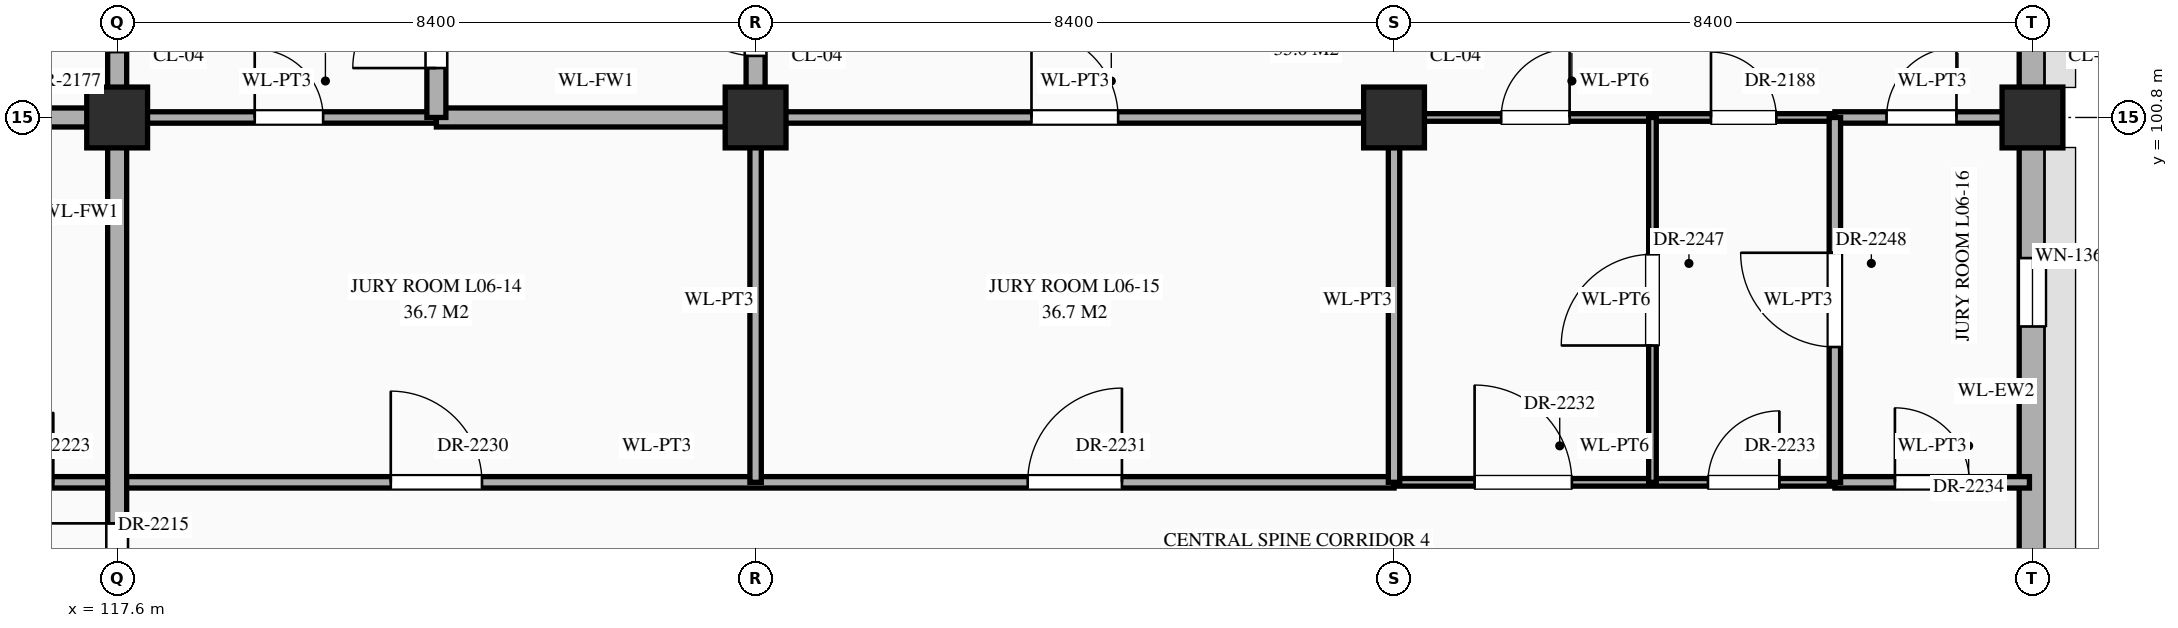
"""IFC4 building model, lengths in metres.
Left out: names, types, materials, properties, quantities, classifications, styles, units other than length and angle.
Written with IfcOpenShell. Run it as: python <this file> out.ifc"""

import sys

from ifc_helpers import new_model, si_unit, direction, frame, frame_2d, origin, origin_2d, place, context, subcontext, project, spatial, rectangle, extrude, element, fill, save


model = new_model("IFC4")
c1 = context("Model", 3, precision=1e-05, world=origin(), true_north=direction((0.0, 1.0)))
c2 = subcontext(c1, "Body", "Model", "MODEL_VIEW")
j1 = project(units=[si_unit("LENGTHUNIT", "METRE"), si_unit("PLANEANGLEUNIT", "RADIAN")], contexts=[c1])
p1 = place(None, origin())
s1 = spatial("IfcSite", under=j1, at=p1, CompositionType="ELEMENT")
p2 = place(p1, origin())
s2 = spatial("IfcBuilding", under=s1, at=p2, CompositionType="ELEMENT")
p3 = place(p2, frame((0.0, 0.0, 26.1)))
s3 = spatial("IfcBuildingStorey", under=s2, at=p3, CompositionType="ELEMENT", Elevation=26.1)
for number, where, z_axis, x_axis in (
    (1, (117.6, 100.8, 0.0), (0.0, 0.0, 1.0), (1.0, 0.0, 0.0)),
    (2, (126.0, 100.8, 0.0), (0.0, 0.0, 1.0), (1.0, 0.0, 0.0)),
    (3, (134.4, 100.8, 0.0), (0.0, 0.0, 1.0), (1.0, 0.0, 0.0)),
    (4, (142.8, 100.8, 0.0), (0.0, 0.0, 1.0), (1.0, 0.0, 0.0)),
):
    element("IfcColumn", number, at=place(p3, frame(where, z_axis=z_axis, x_axis=x_axis)), inside=s3, PredefinedType="COLUMN", context=c2, shape_type="SweptSolid", body=[
        extrude(rectangle(XDim=0.8, YDim=0.8, at=origin_2d()), origin(), (0.0, 0.0, 1.0), 4.5),
    ])
p4 = place(p3, frame((142.8, 93.995, 0.0), z_axis=(0.0, 0.0, 1.0), x_axis=(0.0, 1.0, 0.0)))
e5 = element("IfcWall", 5, at=p4, inside=s3, PredefinedType="STANDARD", context=c2, shape_type="SweptSolid", body=[
    extrude(rectangle(XDim=6.41, YDim=0.35, at=frame_2d((3.205, 0.0))), origin(), (0.0, 0.0, 1.0), 3.59),
])
p5 = place(p4, frame((4.055, 0.0, 0.85)))
e6 = element("IfcOpeningElement", 6, at=p5, cuts=e5, PredefinedType="OPENING", context=c2, shape_type="SweptSolid", body=[
    extrude(rectangle(XDim=0.9, YDim=1.2, at=frame_2d((0.45, 0.6))), frame((0.0, 0.187, 0.0), z_axis=(0.0, -1.0, 0.0), x_axis=(1.0, 0.0, 0.0)), (0.0, 0.0, 1.0), 0.374),
])
p6 = place(p3, frame((142.8, 101.195, 0.0), z_axis=(0.0, 0.0, 1.0), x_axis=(0.0, 1.0, 0.0)))
e7 = element("IfcWall", 7, at=p6, inside=s3, PredefinedType="STANDARD", context=c2, shape_type="SweptSolid", body=[
    extrude(rectangle(XDim=6.41, YDim=0.35, at=frame_2d((3.205, 0.0))), origin(), (0.0, 0.0, 1.0), 3.59),
])
p7 = place(p6, frame((4.055, 0.0, 0.85)))
e8 = element("IfcOpeningElement", 8, at=p7, cuts=e7, PredefinedType="OPENING", context=c2, shape_type="SweptSolid", body=[
    extrude(rectangle(XDim=0.9, YDim=1.38, at=frame_2d((0.45, 0.69))), frame((0.0, 0.187, 0.0), z_axis=(0.0, -1.0, 0.0), x_axis=(1.0, 0.0, 0.0)), (0.0, 0.0, 1.0), 0.374),
])
p8 = place(p3, frame((115.0, 96.0, 0.0), z_axis=(0.0, 0.0, 1.0), x_axis=(1.0, 0.0, 0.0)))
e9 = element("IfcWall", 9, at=p8, inside=s3, PredefinedType="STANDARD", context=c2, shape_type="SweptSolid", body=[
    extrude(rectangle(XDim=19.4, YDim=0.15, at=frame_2d((9.7, 0.0))), origin(), (0.0, 0.0, 1.0), 4.24),
])
p9 = place(p8, frame((0.84, 0.0, 0.0)))
e10 = element("IfcOpeningElement", 10, at=p9, cuts=e9, PredefinedType="OPENING", context=c2, shape_type="SweptSolid", body=[
    extrude(rectangle(XDim=0.92, YDim=2.15, at=frame_2d((0.46, 1.075))), frame((0.0, 0.087, 0.0), z_axis=(0.0, -1.0, 0.0), x_axis=(1.0, 0.0, 0.0)), (0.0, 0.0, 1.0), 0.174),
])
p10 = place(p8, frame((6.2, 0.0, 0.0)))
e11 = element("IfcOpeningElement", 11, at=p10, cuts=e9, PredefinedType="OPENING", context=c2, shape_type="SweptSolid", body=[
    extrude(rectangle(XDim=1.2, YDim=2.35, at=frame_2d((0.6, 1.175))), frame((0.0, 0.087, 0.0), z_axis=(0.0, -1.0, 0.0), x_axis=(1.0, 0.0, 0.0)), (0.0, 0.0, 1.0), 0.174),
])
p11 = place(p8, frame((14.58, 0.0, 0.0)))
e12 = element("IfcOpeningElement", 12, at=p11, cuts=e9, PredefinedType="OPENING", context=c2, shape_type="SweptSolid", body=[
    extrude(rectangle(XDim=1.24, YDim=2.3, at=frame_2d((0.62, 1.15))), frame((0.0, 0.087, 0.0), z_axis=(0.0, -1.0, 0.0), x_axis=(1.0, 0.0, 0.0)), (0.0, 0.0, 1.0), 0.174),
])
p12 = place(p3, frame((134.4, 96.0, 0.0), z_axis=(0.0, 0.0, 1.0), x_axis=(1.0, 0.0, 0.0)))
e13 = element("IfcWall", 13, at=p12, inside=s3, PredefinedType="STANDARD", context=c2, shape_type="SweptSolid", body=[
    extrude(rectangle(XDim=5.8, YDim=0.1, at=frame_2d((2.9, 0.0))), origin(), (0.0, 0.0, 1.0), 4.24),
])
p13 = place(p12, frame((1.06, 0.0, 0.0)))
e14 = element("IfcOpeningElement", 14, at=p13, cuts=e13, PredefinedType="OPENING", context=c2, shape_type="SweptSolid", body=[
    extrude(rectangle(XDim=1.28, YDim=2.35, at=frame_2d((0.64, 1.175))), frame((0.0, 0.062, 0.0), z_axis=(0.0, -1.0, 0.0), x_axis=(1.0, 0.0, 0.0)), (0.0, 0.0, 1.0), 0.124),
])
p14 = place(p12, frame((4.13, 0.0, 0.0)))
e15 = element("IfcOpeningElement", 15, at=p14, cuts=e13, PredefinedType="OPENING", context=c2, shape_type="SweptSolid", body=[
    extrude(rectangle(XDim=0.94, YDim=2.3, at=frame_2d((0.47, 1.15))), frame((0.0, 0.062, 0.0), z_axis=(0.0, -1.0, 0.0), x_axis=(1.0, 0.0, 0.0)), (0.0, 0.0, 1.0), 0.124),
])
p15 = place(p3, frame((140.2, 96.0, 0.0), z_axis=(0.0, 0.0, 1.0), x_axis=(1.0, 0.0, 0.0)))
e16 = element("IfcWall", 16, at=p15, inside=s3, PredefinedType="STANDARD", context=c2, shape_type="SweptSolid", body=[
    extrude(rectangle(XDim=2.56, YDim=0.15, at=frame_2d((1.28, 0.0))), origin(), (0.0, 0.0, 1.0), 4.24),
])
p16 = place(p15, frame((0.79, 0.0, 0.0)))
e17 = element("IfcOpeningElement", 17, at=p16, cuts=e16, PredefinedType="OPENING", context=c2, shape_type="SweptSolid", body=[
    extrude(rectangle(XDim=0.98, YDim=2.35, at=frame_2d((0.49, 1.175))), frame((0.0, 0.087, 0.0), z_axis=(0.0, -1.0, 0.0), x_axis=(1.0, 0.0, 0.0)), (0.0, 0.0, 1.0), 0.174),
])
p17 = place(p3, frame((113.4, 100.8, 0.0), z_axis=(0.0, 0.0, 1.0), x_axis=(1.0, 0.0, 0.0)))
e18 = element("IfcWall", 18, at=p17, inside=s3, PredefinedType="STANDARD", context=c2, shape_type="SweptSolid", body=[
    extrude(rectangle(XDim=4.2, YDim=0.25, at=frame_2d((2.1, 0.0))), origin(), (0.0, 0.0, 1.0), 3.39),
])
p18 = place(p17, frame((0.3, 0.0, 0.0)))
e19 = element("IfcOpeningElement", 19, at=p18, cuts=e18, PredefinedType="OPENING", context=c2, shape_type="SweptSolid", body=[
    extrude(rectangle(XDim=1.0, YDim=2.2, at=frame_2d((0.5, 1.1))), frame((0.0, 0.137, 0.0), z_axis=(0.0, -1.0, 0.0), x_axis=(1.0, 0.0, 0.0)), (0.0, 0.0, 1.0), 0.274),
])
p19 = place(p17, frame((2.265, 0.0, 0.0)))
e20 = element("IfcOpeningElement", 20, at=p19, cuts=e18, PredefinedType="OPENING", context=c2, shape_type="SweptSolid", body=[
    extrude(rectangle(XDim=0.95, YDim=2.15, at=frame_2d((0.475, 1.075))), frame((0.0, 0.137, 0.0), z_axis=(0.0, -1.0, 0.0), x_axis=(1.0, 0.0, 0.0)), (0.0, 0.0, 1.0), 0.274),
])
p20 = place(p3, frame((117.6, 100.8, 0.0), z_axis=(0.0, 0.0, 1.0), x_axis=(1.0, 0.0, 0.0)))
e21 = element("IfcWall", 21, at=p20, inside=s3, PredefinedType="STANDARD", context=c2, shape_type="SweptSolid", body=[
    extrude(rectangle(XDim=4.2, YDim=0.15, at=frame_2d((2.1, 0.0))), origin(), (0.0, 0.0, 1.0), 3.39),
])
p21 = place(p20, frame((1.81, 0.0, 0.0)))
e22 = element("IfcOpeningElement", 22, at=p21, cuts=e21, PredefinedType="OPENING", context=c2, shape_type="SweptSolid", body=[
    extrude(rectangle(XDim=0.9, YDim=2.15, at=frame_2d((0.45, 1.075))), frame((0.0, 0.087, 0.0), z_axis=(0.0, -1.0, 0.0), x_axis=(1.0, 0.0, 0.0)), (0.0, 0.0, 1.0), 0.174),
])
p22 = place(p3, frame((121.8, 100.8, 0.0), z_axis=(0.0, 0.0, 1.0), x_axis=(1.0, 0.0, 0.0)))
e23 = element("IfcWall", 23, at=p22, inside=s3, PredefinedType="STANDARD", context=c2, shape_type="SweptSolid", body=[
    extrude(rectangle(XDim=4.2, YDim=0.25, at=frame_2d((2.1, 0.0))), origin(), (0.0, 0.0, 1.0), 3.39),
])
p23 = place(p3, frame((126.0, 100.8, 0.0), z_axis=(0.0, 0.0, 1.0), x_axis=(1.0, 0.0, 0.0)))
e24 = element("IfcWall", 24, at=p23, inside=s3, PredefinedType="STANDARD", context=c2, shape_type="SweptSolid", body=[
    extrude(rectangle(XDim=8.4, YDim=0.15, at=frame_2d((4.2, 0.0))), origin(), (0.0, 0.0, 1.0), 3.39),
])
p24 = place(p23, frame((3.63, 0.0, 0.0)))
e25 = element("IfcOpeningElement", 25, at=p24, cuts=e24, PredefinedType="OPENING", context=c2, shape_type="SweptSolid", body=[
    extrude(rectangle(XDim=1.14, YDim=2.4, at=frame_2d((0.57, 1.2))), frame((0.0, 0.087, 0.0), z_axis=(0.0, -1.0, 0.0), x_axis=(1.0, 0.0, 0.0)), (0.0, 0.0, 1.0), 0.174),
])
p25 = place(p3, frame((134.4, 100.8, 0.0), z_axis=(0.0, 0.0, 1.0), x_axis=(1.0, 0.0, 0.0)))
e26 = element("IfcWall", 26, at=p25, inside=s3, PredefinedType="STANDARD", context=c2, shape_type="SweptSolid", body=[
    extrude(rectangle(XDim=5.8, YDim=0.1, at=frame_2d((2.9, 0.0))), origin(), (0.0, 0.0, 1.0), 3.39),
])
p26 = place(p25, frame((1.41, 0.0, 0.0)))
e27 = element("IfcOpeningElement", 27, at=p26, cuts=e26, PredefinedType="OPENING", context=c2, shape_type="SweptSolid", body=[
    extrude(rectangle(XDim=0.9, YDim=2.15, at=frame_2d((0.45, 1.075))), frame((0.0, 0.062, 0.0), z_axis=(0.0, -1.0, 0.0), x_axis=(1.0, 0.0, 0.0)), (0.0, 0.0, 1.0), 0.124),
])
p27 = place(p25, frame((4.17, 0.0, 0.0)))
e28 = element("IfcOpeningElement", 28, at=p27, cuts=e26, PredefinedType="OPENING", context=c2, shape_type="SweptSolid", body=[
    extrude(rectangle(XDim=0.86, YDim=2.1, at=frame_2d((0.43, 1.05))), frame((0.0, 0.062, 0.0), z_axis=(0.0, -1.0, 0.0), x_axis=(1.0, 0.0, 0.0)), (0.0, 0.0, 1.0), 0.124),
])
p28 = place(p3, frame((140.2, 100.8, 0.0), z_axis=(0.0, 0.0, 1.0), x_axis=(1.0, 0.0, 0.0)))
e29 = element("IfcWall", 29, at=p28, inside=s3, PredefinedType="STANDARD", context=c2, shape_type="SweptSolid", body=[
    extrude(rectangle(XDim=2.56, YDim=0.15, at=frame_2d((1.28, 0.0))), origin(), (0.0, 0.0, 1.0), 3.39),
])
p29 = place(p28, frame((0.68, 0.0, 0.0)))
e30 = element("IfcOpeningElement", 30, at=p29, cuts=e29, PredefinedType="OPENING", context=c2, shape_type="SweptSolid", body=[
    extrude(rectangle(XDim=0.92, YDim=2.15, at=frame_2d((0.46, 1.075))), frame((0.0, 0.087, 0.0), z_axis=(0.0, -1.0, 0.0), x_axis=(1.0, 0.0, 0.0)), (0.0, 0.0, 1.0), 0.174),
])
p30 = place(p3, frame((117.6, 91.2, 0.0), z_axis=(0.0, 0.0, 1.0), x_axis=(0.0, 1.0, 0.0)))
e31 = element("IfcWall", 31, at=p30, inside=s3, PredefinedType="STANDARD", context=c2, shape_type="SweptSolid", body=[
    extrude(rectangle(XDim=13.2, YDim=0.25, at=frame_2d((6.6, 0.0))), origin(), (0.0, 0.0, 1.0), 3.49),
])
p31 = place(p30, frame((0.49, 0.0, 0.0)))
e32 = element("IfcOpeningElement", 32, at=p31, cuts=e31, PredefinedType="OPENING", context=c2, shape_type="SweptSolid", body=[
    extrude(rectangle(XDim=1.1, YDim=2.2, at=frame_2d((0.55, 1.1))), frame((0.0, 0.137, 0.0), z_axis=(0.0, -1.0, 0.0), x_axis=(1.0, 0.0, 0.0)), (0.0, 0.0, 1.0), 0.274),
])
p32 = place(p30, frame((10.46, 0.0, 0.0)))
e33 = element("IfcOpeningElement", 33, at=p32, cuts=e31, PredefinedType="OPENING", context=c2, shape_type="SweptSolid", body=[
    extrude(rectangle(XDim=1.0, YDim=2.2, at=frame_2d((0.5, 1.1))), frame((0.0, 0.137, 0.0), z_axis=(0.0, -1.0, 0.0), x_axis=(1.0, 0.0, 0.0)), (0.0, 0.0, 1.0), 0.274),
])
p33 = place(p30, frame((3.26, 0.0, 0.0)))
e34 = element("IfcOpeningElement", 34, at=p33, cuts=e31, PredefinedType="OPENING", context=c2, shape_type="SweptSolid", body=[
    extrude(rectangle(XDim=1.0, YDim=2.2, at=frame_2d((0.5, 1.1))), frame((0.0, 0.137, 0.0), z_axis=(0.0, -1.0, 0.0), x_axis=(1.0, 0.0, 0.0)), (0.0, 0.0, 1.0), 0.274),
])
p34 = place(p3, frame((121.8, 100.8, 0.0), z_axis=(0.0, 0.0, 1.0), x_axis=(0.0, 1.0, 0.0)))
e35 = element("IfcWall", 35, at=p34, inside=s3, PredefinedType="STANDARD", context=c2, shape_type="SweptSolid", body=[
    extrude(rectangle(XDim=3.6, YDim=0.25, at=frame_2d((1.8, 0.0))), origin(), (0.0, 0.0, 1.0), 3.89),
])
p35 = place(p34, frame((0.65, 0.0, 0.0)))
e36 = element("IfcOpeningElement", 36, at=p35, cuts=e35, PredefinedType="OPENING", context=c2, shape_type="SweptSolid", body=[
    extrude(rectangle(XDim=1.1, YDim=2.2, at=frame_2d((0.55, 1.1))), frame((0.0, 0.137, 0.0), z_axis=(0.0, -1.0, 0.0), x_axis=(1.0, 0.0, 0.0)), (0.0, 0.0, 1.0), 0.274),
])
p36 = place(p3, frame((126.0, 96.0, 0.0), z_axis=(0.0, 0.0, 1.0), x_axis=(0.0, 1.0, 0.0)))
e37 = element("IfcWall", 37, at=p36, inside=s3, PredefinedType="STANDARD", context=c2, shape_type="SweptSolid", body=[
    extrude(rectangle(XDim=4.8, YDim=0.15, at=frame_2d((2.4, 0.0))), origin(), (0.0, 0.0, 1.0), 3.49),
])
p37 = place(p3, frame((126.0, 100.8, 0.0), z_axis=(0.0, 0.0, 1.0), x_axis=(0.0, 1.0, 0.0)))
e38 = element("IfcWall", 38, at=p37, inside=s3, PredefinedType="STANDARD", context=c2, shape_type="SweptSolid", body=[
    extrude(rectangle(XDim=3.6, YDim=0.25, at=frame_2d((1.8, 0.0))), origin(), (0.0, 0.0, 1.0), 3.49),
])
p38 = place(p37, frame((0.81, 0.0, 0.0)))
e39 = element("IfcOpeningElement", 39, at=p38, cuts=e38, PredefinedType="OPENING", context=c2, shape_type="SweptSolid", body=[
    extrude(rectangle(XDim=1.1, YDim=2.2, at=frame_2d((0.55, 1.1))), frame((0.0, 0.137, 0.0), z_axis=(0.0, -1.0, 0.0), x_axis=(1.0, 0.0, 0.0)), (0.0, 0.0, 1.0), 0.274),
])
p39 = place(p3, frame((134.4, 96.0, 0.0), z_axis=(0.0, 0.0, 1.0), x_axis=(0.0, 1.0, 0.0)))
e40 = element("IfcWall", 40, at=p39, inside=s3, PredefinedType="STANDARD", context=c2, shape_type="SweptSolid", body=[
    extrude(rectangle(XDim=4.8, YDim=0.15, at=frame_2d((2.4, 0.0))), origin(), (0.0, 0.0, 1.0), 4.24),
])
p40 = place(p3, frame((137.8, 96.0, 0.0), z_axis=(0.0, 0.0, 1.0), x_axis=(0.0, 1.0, 0.0)))
e41 = element("IfcWall", 41, at=p40, inside=s3, PredefinedType="STANDARD", context=c2, shape_type="SweptSolid", body=[
    extrude(rectangle(XDim=4.8, YDim=0.1, at=frame_2d((2.4, 0.0))), origin(), (0.0, 0.0, 1.0), 4.24),
])
p41 = place(p40, frame((1.8, 0.0, 0.0)))
e42 = element("IfcOpeningElement", 42, at=p41, cuts=e41, PredefinedType="OPENING", context=c2, shape_type="SweptSolid", body=[
    extrude(rectangle(XDim=1.2, YDim=2.35, at=frame_2d((0.6, 1.175))), frame((0.0, 0.062, 0.0), z_axis=(0.0, -1.0, 0.0), x_axis=(1.0, 0.0, 0.0)), (0.0, 0.0, 1.0), 0.124),
])
p42 = place(p3, frame((140.2, 96.0, 0.0), z_axis=(0.0, 0.0, 1.0), x_axis=(0.0, 1.0, 0.0)))
e43 = element("IfcWall", 43, at=p42, inside=s3, PredefinedType="STANDARD", context=c2, shape_type="SweptSolid", body=[
    extrude(rectangle(XDim=4.8, YDim=0.15, at=frame_2d((2.4, 0.0))), origin(), (0.0, 0.0, 1.0), 4.24),
])
p43 = place(p42, frame((1.78, 0.0, 0.0)))
e44 = element("IfcOpeningElement", 44, at=p43, cuts=e43, PredefinedType="OPENING", context=c2, shape_type="SweptSolid", body=[
    extrude(rectangle(XDim=1.24, YDim=2.3, at=frame_2d((0.62, 1.15))), frame((0.0, 0.087, 0.0), z_axis=(0.0, -1.0, 0.0), x_axis=(1.0, 0.0, 0.0)), (0.0, 0.0, 1.0), 0.174),
])
p44 = place(p5, origin())
e45 = element("IfcWindow", 45, at=p44, inside=s3, PartitioningType="SINGLE_PANEL", PredefinedType="WINDOW", context=c2, shape_type="SweptSolid", body=[
    extrude(rectangle(XDim=0.9, YDim=1.2, at=frame_2d((0.45, 0.6))), frame((0.0, 0.03, 0.0), z_axis=(0.0, -1.0, 0.0), x_axis=(1.0, 0.0, 0.0)), (0.0, 0.0, 1.0), 0.06),
])
fill(e6, e45)
p45 = place(p35, origin())
e46 = element("IfcDoor", 46, at=p45, inside=s3, OperationType="SINGLE_SWING_LEFT", PredefinedType="DOOR", context=c2, shape_type="SweptSolid", body=[
    extrude(rectangle(XDim=1.1, YDim=2.2, at=frame_2d((0.55, 1.1))), frame((0.0, 0.025, 0.0), z_axis=(0.0, -1.0, 0.0), x_axis=(1.0, 0.0, 0.0)), (0.0, 0.0, 1.0), 0.05),
])
fill(e36, e46)
p46 = place(p21, origin())
e47 = element("IfcDoor", 47, at=p46, inside=s3, OperationType="SINGLE_SWING_LEFT", PredefinedType="DOOR", context=c2, shape_type="SweptSolid", body=[
    extrude(rectangle(XDim=0.9, YDim=2.15, at=frame_2d((0.45, 1.075))), frame((0.0, 0.025, 0.0), z_axis=(0.0, -1.0, 0.0), x_axis=(1.0, 0.0, 0.0)), (0.0, 0.0, 1.0), 0.05),
])
fill(e22, e47)
p47 = place(p38, origin())
e48 = element("IfcDoor", 48, at=p47, inside=s3, OperationType="SINGLE_SWING_RIGHT", PredefinedType="DOOR", context=c2, shape_type="SweptSolid", body=[
    extrude(rectangle(XDim=1.1, YDim=2.2, at=frame_2d((0.55, 1.1))), frame((0.0, 0.025, 0.0), z_axis=(0.0, -1.0, 0.0), x_axis=(1.0, 0.0, 0.0)), (0.0, 0.0, 1.0), 0.05),
])
fill(e39, e48)
p48 = place(p24, origin())
e49 = element("IfcDoor", 49, at=p48, inside=s3, OperationType="SINGLE_SWING_LEFT", PredefinedType="DOOR", context=c2, shape_type="SweptSolid", body=[
    extrude(rectangle(XDim=1.14, YDim=2.4, at=frame_2d((0.57, 1.2))), frame((0.0, 0.025, 0.0), z_axis=(0.0, -1.0, 0.0), x_axis=(1.0, 0.0, 0.0)), (0.0, 0.0, 1.0), 0.05),
])
fill(e25, e49)
p49 = place(p26, origin())
e50 = element("IfcDoor", 50, at=p49, inside=s3, OperationType="SINGLE_SWING_RIGHT", PredefinedType="DOOR", context=c2, shape_type="SweptSolid", body=[
    extrude(rectangle(XDim=0.9, YDim=2.15, at=frame_2d((0.45, 1.075))), frame((0.0, 0.025, 0.0), z_axis=(0.0, -1.0, 0.0), x_axis=(1.0, 0.0, 0.0)), (0.0, 0.0, 1.0), 0.05),
])
fill(e27, e50)
p50 = place(p27, origin())
e51 = element("IfcDoor", 51, at=p50, inside=s3, OperationType="SINGLE_SWING_LEFT", PredefinedType="DOOR", context=c2, shape_type="SweptSolid", body=[
    extrude(rectangle(XDim=0.86, YDim=2.1, at=frame_2d((0.43, 1.05))), frame((0.0, 0.025, 0.0), z_axis=(0.0, -1.0, 0.0), x_axis=(1.0, 0.0, 0.0)), (0.0, 0.0, 1.0), 0.05),
])
fill(e28, e51)
p51 = place(p29, origin())
e52 = element("IfcDoor", 52, at=p51, inside=s3, OperationType="SINGLE_SWING_RIGHT", PredefinedType="DOOR", context=c2, shape_type="SweptSolid", body=[
    extrude(rectangle(XDim=0.92, YDim=2.15, at=frame_2d((0.46, 1.075))), frame((0.0, 0.025, 0.0), z_axis=(0.0, -1.0, 0.0), x_axis=(1.0, 0.0, 0.0)), (0.0, 0.0, 1.0), 0.05),
])
fill(e30, e52)
p52 = place(p33, origin())
e53 = element("IfcDoor", 53, at=p52, inside=s3, OperationType="SINGLE_SWING_RIGHT", PredefinedType="DOOR", context=c2, shape_type="SweptSolid", body=[
    extrude(rectangle(XDim=1.0, YDim=2.2, at=frame_2d((0.5, 1.1))), frame((0.0, 0.025, 0.0), z_axis=(0.0, -1.0, 0.0), x_axis=(1.0, 0.0, 0.0)), (0.0, 0.0, 1.0), 0.05),
])
fill(e34, e53)
p53 = place(p9, origin())
e54 = element("IfcDoor", 54, at=p53, inside=s3, OperationType="SINGLE_SWING_RIGHT", PredefinedType="DOOR", context=c2, shape_type="SweptSolid", body=[
    extrude(rectangle(XDim=0.92, YDim=2.15, at=frame_2d((0.46, 1.075))), frame((0.0, 0.025, 0.0), z_axis=(0.0, -1.0, 0.0), x_axis=(1.0, 0.0, 0.0)), (0.0, 0.0, 1.0), 0.05),
])
fill(e10, e54)
p54 = place(p10, origin())
e55 = element("IfcDoor", 55, at=p54, inside=s3, OperationType="SINGLE_SWING_LEFT", PredefinedType="DOOR", context=c2, shape_type="SweptSolid", body=[
    extrude(rectangle(XDim=1.2, YDim=2.35, at=frame_2d((0.6, 1.175))), frame((0.0, 0.025, 0.0), z_axis=(0.0, -1.0, 0.0), x_axis=(1.0, 0.0, 0.0)), (0.0, 0.0, 1.0), 0.05),
])
fill(e11, e55)
p55 = place(p11, origin())
e56 = element("IfcDoor", 56, at=p55, inside=s3, OperationType="SINGLE_SWING_RIGHT", PredefinedType="DOOR", context=c2, shape_type="SweptSolid", body=[
    extrude(rectangle(XDim=1.24, YDim=2.3, at=frame_2d((0.62, 1.15))), frame((0.0, 0.025, 0.0), z_axis=(0.0, -1.0, 0.0), x_axis=(1.0, 0.0, 0.0)), (0.0, 0.0, 1.0), 0.05),
])
fill(e12, e56)
p56 = place(p13, origin())
e57 = element("IfcDoor", 57, at=p56, inside=s3, OperationType="SINGLE_SWING_LEFT", PredefinedType="DOOR", context=c2, shape_type="SweptSolid", body=[
    extrude(rectangle(XDim=1.28, YDim=2.35, at=frame_2d((0.64, 1.175))), frame((0.0, 0.025, 0.0), z_axis=(0.0, -1.0, 0.0), x_axis=(1.0, 0.0, 0.0)), (0.0, 0.0, 1.0), 0.05),
])
fill(e14, e57)
p57 = place(p14, origin())
e58 = element("IfcDoor", 58, at=p57, inside=s3, OperationType="SINGLE_SWING_RIGHT", PredefinedType="DOOR", context=c2, shape_type="SweptSolid", body=[
    extrude(rectangle(XDim=0.94, YDim=2.3, at=frame_2d((0.47, 1.15))), frame((0.0, 0.025, 0.0), z_axis=(0.0, -1.0, 0.0), x_axis=(1.0, 0.0, 0.0)), (0.0, 0.0, 1.0), 0.05),
])
fill(e15, e58)
p58 = place(p16, origin())
e59 = element("IfcDoor", 59, at=p58, inside=s3, OperationType="SINGLE_SWING_LEFT", PredefinedType="DOOR", context=c2, shape_type="SweptSolid", body=[
    extrude(rectangle(XDim=0.98, YDim=2.35, at=frame_2d((0.49, 1.175))), frame((0.0, 0.025, 0.0), z_axis=(0.0, -1.0, 0.0), x_axis=(1.0, 0.0, 0.0)), (0.0, 0.0, 1.0), 0.05),
])
fill(e17, e59)
p59 = place(p41, origin())
e60 = element("IfcDoor", 60, at=p59, inside=s3, OperationType="SINGLE_SWING_LEFT", PredefinedType="DOOR", context=c2, shape_type="SweptSolid", body=[
    extrude(rectangle(XDim=1.2, YDim=2.35, at=frame_2d((0.6, 1.175))), frame((0.0, 0.025, 0.0), z_axis=(0.0, -1.0, 0.0), x_axis=(1.0, 0.0, 0.0)), (0.0, 0.0, 1.0), 0.05),
])
fill(e42, e60)
p60 = place(p43, origin())
e61 = element("IfcDoor", 61, at=p60, inside=s3, OperationType="SINGLE_SWING_RIGHT", PredefinedType="DOOR", context=c2, shape_type="SweptSolid", body=[
    extrude(rectangle(XDim=1.24, YDim=2.3, at=frame_2d((0.62, 1.15))), frame((0.0, 0.025, 0.0), z_axis=(0.0, -1.0, 0.0), x_axis=(1.0, 0.0, 0.0)), (0.0, 0.0, 1.0), 0.05),
])
fill(e44, e61)
save(model, sys.argv[1])
